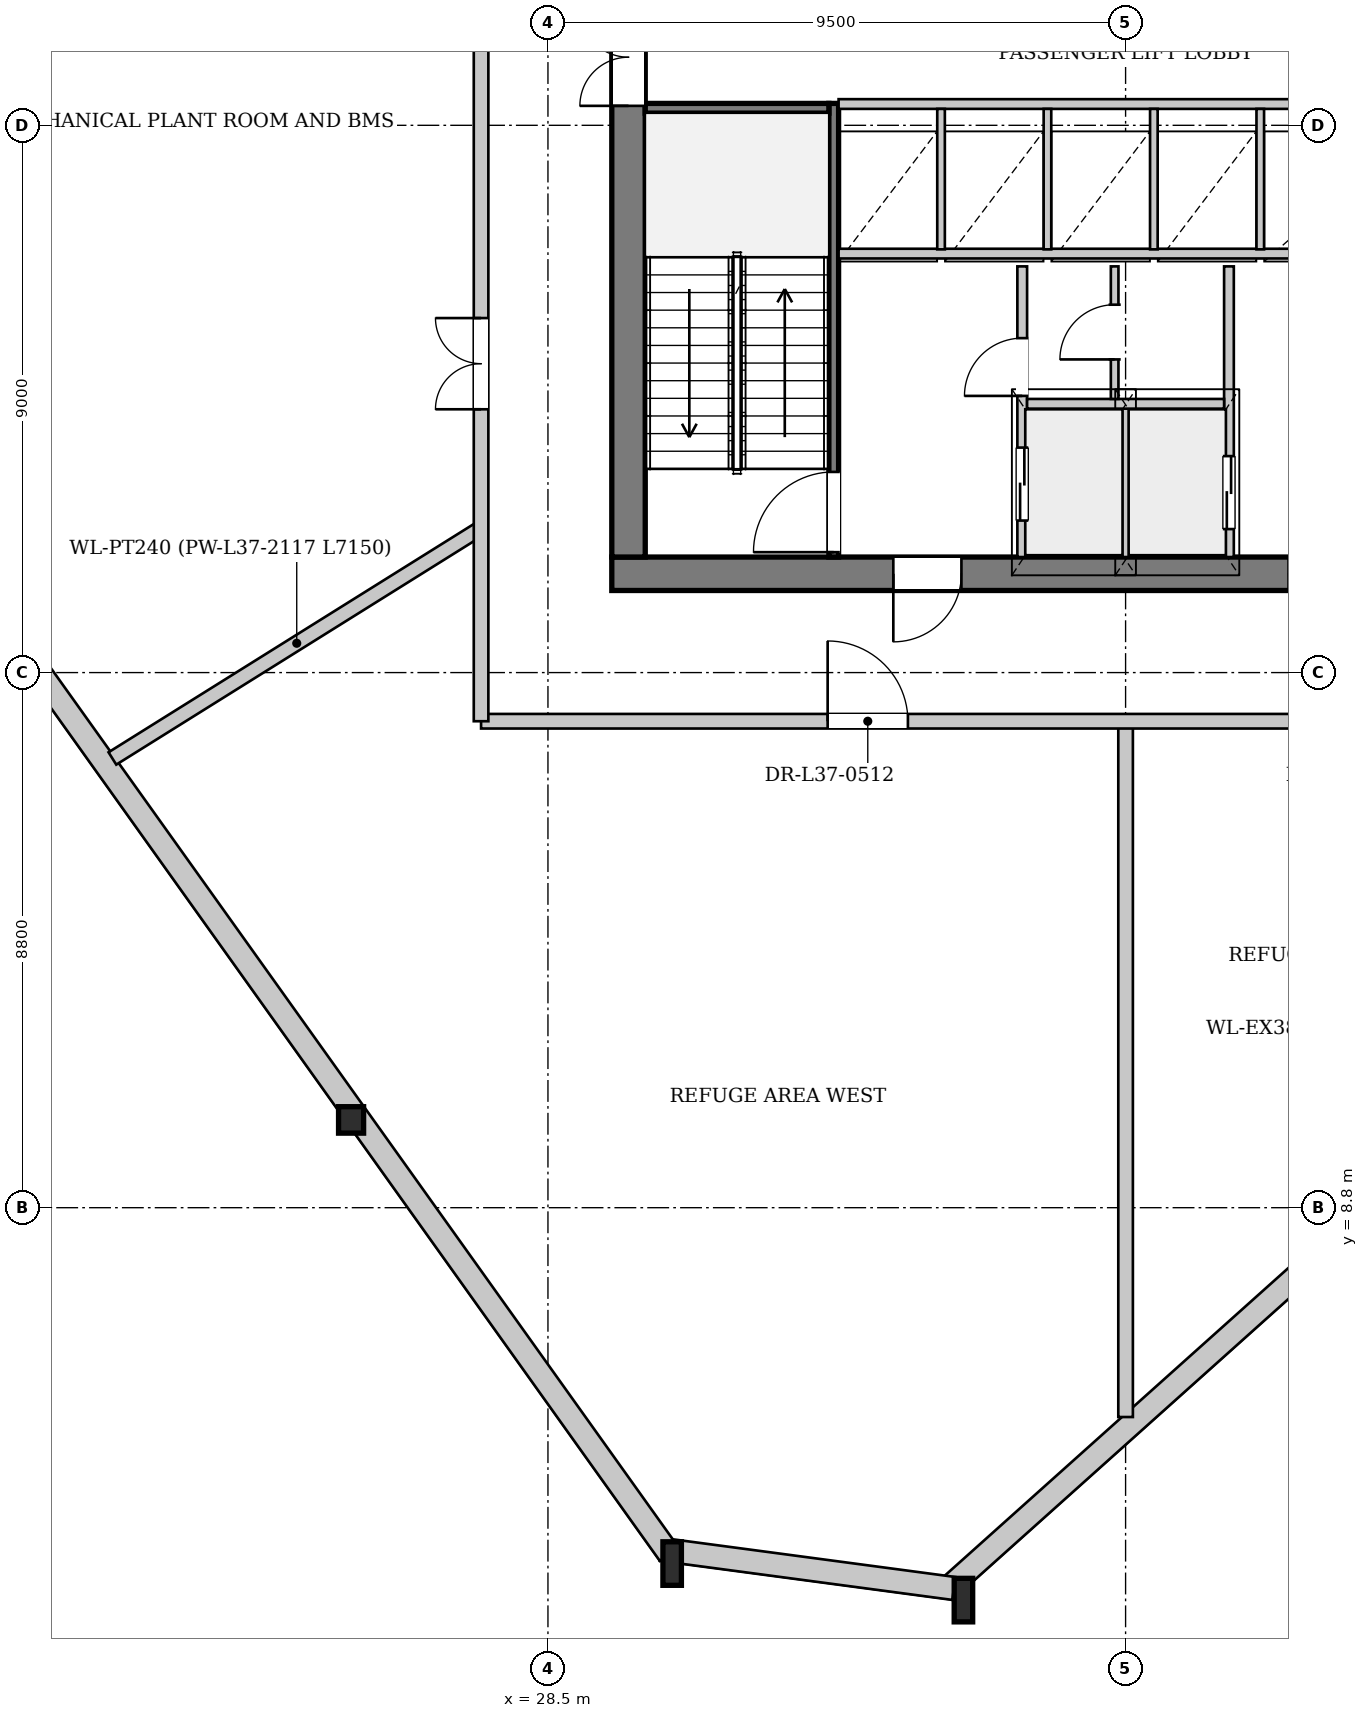
"""IFC4 building model, lengths in metres.
Left out: names, types, materials, properties, quantities, classifications, styles, units other than length and angle.
Written with IfcOpenShell. Run it as: python <this file> out.ifc"""

import sys

from ifc_helpers import new_model, si_unit, direction, frame, frame_2d, origin, origin_2d, place, context, subcontext, project, spatial, rectangle, i_section, extrude, source, transform, mapped, element, fill, save


model = new_model("IFC4")
c1 = context("Model", 3, precision=1e-05, world=origin(), true_north=direction((0.0, 1.0)))
c2 = subcontext(c1, "Body", "Model", "MODEL_VIEW")
j1 = project(units=[si_unit("LENGTHUNIT", "METRE"), si_unit("PLANEANGLEUNIT", "RADIAN")], contexts=[c1])
p1 = place(None, origin())
s1 = spatial("IfcSite", under=j1, at=p1, CompositionType="ELEMENT")
p2 = place(p1, origin())
s2 = spatial("IfcBuilding", under=s1, at=p2, CompositionType="ELEMENT")
p3 = place(p2, frame((0.0, 0.0, 142.1)))
s3 = spatial("IfcBuildingStorey", under=s2, at=p3, CompositionType="ELEMENT", Elevation=142.1)
m1 = source(origin(), c2, "Body", "SweptSolid", [
    extrude(i_section(OverallWidth=0.412, OverallDepth=0.435, WebThickness=0.031, FlangeThickness=0.05, at=origin_2d()), origin(), (0.0, 0.0, 1.0), 4.348),
])
p4 = place(p3, frame((19.868, 17.66, 0.0), z_axis=(0.052224238999, -0.055537389645, 0.997089879205), x_axis=(0.728502673194, 0.685042958616, 0.0)))
e1 = element("IfcColumn", 1, at=p4, inside=s3, PredefinedType="COLUMN", context=c2, shape_type="MappedRepresentation", body=[
    mapped(m1, transform((0.0, 0.0, 0.0), x_axis=(1.0, 0.0, 0.0), y_axis=(0.0, 1.0, 0.0), z_axis=(0.0, 0.0, 1.0), scale=1.0)),
])
m2 = source(origin(), c2, "Body", "SweptSolid", [
    extrude(i_section(OverallWidth=0.412, OverallDepth=0.435, WebThickness=0.031, FlangeThickness=0.05, at=origin_2d()), origin(), (0.0, 0.0, 1.0), 4.35),
])
p5 = place(p3, frame((25.104, 10.326, 0.0), z_axis=(0.072799172678, -0.037943130864, 0.996624602986), x_axis=(0.46219210593, 0.886779824543, 0.0)))
e2 = element("IfcColumn", 2, at=p5, inside=s3, PredefinedType="COLUMN", context=c2, shape_type="MappedRepresentation", body=[
    mapped(m2, transform((0.0, 0.0, 0.0), x_axis=(1.0, 0.0, 0.0), y_axis=(0.0, 1.0, 0.0), z_axis=(0.0, 0.0, 1.0), scale=1.0)),
])
m3 = source(origin(), c2, "Body", "SweptSolid", [
    extrude(i_section(OverallWidth=0.304, OverallDepth=0.716, WebThickness=0.021, FlangeThickness=0.04, at=origin_2d()), origin(), (0.0, 0.0, 1.0), 4.355),
])
p6 = place(p3, frame((30.34, 2.992, 0.0), z_axis=(0.093342536899, -0.02018217014, 0.995429480583), x_axis=(0.211332792528, 0.97741416544, 0.0)))
e3 = element("IfcColumn", 3, at=p6, inside=s3, PredefinedType="COLUMN", context=c2, shape_type="MappedRepresentation", body=[
    mapped(m3, transform((0.0, 0.0, 0.0), x_axis=(1.0, 0.0, 0.0), y_axis=(0.0, 1.0, 0.0), z_axis=(0.0, 0.0, 1.0), scale=1.0)),
])
m4 = source(origin(), c2, "Body", "SweptSolid", [
    extrude(i_section(OverallWidth=0.304, OverallDepth=0.716, WebThickness=0.021, FlangeThickness=0.04, at=origin_2d()), origin(), (0.0, 0.0, 1.0), 4.35),
])
p7 = place(p3, frame((35.151, 2.35, 0.0), z_axis=(0.083899938538, -0.001459129366, 0.996473116173), x_axis=(0.017388674879, 0.999848805563, 0.0)))
e4 = element("IfcColumn", 4, at=p7, inside=s3, PredefinedType="COLUMN", context=c2, shape_type="MappedRepresentation", body=[
    mapped(m4, transform((0.0, 0.0, 0.0), x_axis=(1.0, 0.0, 0.0), y_axis=(0.0, 1.0, 0.0), z_axis=(0.0, 0.0, 1.0), scale=1.0)),
])
p8 = place(p3, frame((52.652, 18.275, 0.0), z_axis=(0.0, 0.0, 1.0), x_axis=(-0.744998125176, -0.667066558511, 0.0)))
e5 = element("IfcWall", 5, at=p8, inside=s3, PredefinedType="SOLIDWALL", context=c2, shape_type="SweptSolid", body=[
    extrude(rectangle(XDim=23.662, YDim=0.38, at=frame_2d((11.831, 0.0))), origin(), (0.0, 0.0, 1.0), 3.642),
])
p9 = place(p3, frame((35.176, 2.538, 0.0), z_axis=(0.0, 0.0, 1.0), x_axis=(-0.991211199336, 0.132288919834, 0.0)))
e6 = element("IfcWall", 6, at=p9, inside=s3, PredefinedType="SOLIDWALL", context=c2, shape_type="SweptSolid", body=[
    extrude(rectangle(XDim=4.854, YDim=0.38, at=frame_2d((2.427, 0.0))), origin(), (0.0, 0.0, 1.0), 3.642),
])
p10 = place(p3, frame((30.494, 3.102, 0.0), z_axis=(0.0, 0.0, 1.0), x_axis=(-0.581022893879, 0.813887213801, 0.0)))
e7 = element("IfcWall", 7, at=p10, inside=s3, PredefinedType="SOLIDWALL", context=c2, shape_type="SweptSolid", body=[
    extrude(rectangle(XDim=18.022, YDim=0.38, at=frame_2d((9.011, 0.0))), origin(), (0.0, 0.0, 1.0), 3.642),
])
p11 = place(p3, frame((46.45, 19.225, 0.0), z_axis=(0.0, 0.0, 1.0), x_axis=(-1.0, 0.0, 0.0)))
e8 = element("IfcWall", 8, at=p11, inside=s3, PredefinedType="SHEAR", context=c2, shape_type="SweptSolid", body=[
    extrude(rectangle(XDim=16.9, YDim=0.55, at=frame_2d((8.45, 0.0))), origin(), (0.0, 0.0, 1.0), 4.25),
])
p12 = place(p11, frame((4.65, 0.0, 0.0)))
e9 = element("IfcOpeningElement", 9, at=p12, cuts=e8, PredefinedType="OPENING", context=c2, shape_type="SweptSolid", body=[
    extrude(rectangle(XDim=1.12, YDim=2.25, at=frame_2d((0.56, 1.125))), frame((0.0, 0.285, 0.0), z_axis=(0.0, -1.0, 0.0), x_axis=(1.0, 0.0, 0.0)), (0.0, 0.0, 1.0), 0.57),
])
p13 = place(p11, frame((11.15, 0.0, 0.0)))
e10 = element("IfcOpeningElement", 10, at=p13, cuts=e8, PredefinedType="OPENING", context=c2, shape_type="SweptSolid", body=[
    extrude(rectangle(XDim=1.12, YDim=2.25, at=frame_2d((0.56, 1.125))), frame((0.0, 0.285, 0.0), z_axis=(0.0, -1.0, 0.0), x_axis=(1.0, 0.0, 0.0)), (0.0, 0.0, 1.0), 0.57),
])
p14 = place(p3, frame((29.825, 19.5, 0.0), z_axis=(0.0, 0.0, 1.0), x_axis=(0.0, 1.0, 0.0)))
e11 = element("IfcWall", 11, at=p14, inside=s3, PredefinedType="SHEAR", context=c2, shape_type="SweptSolid", body=[
    extrude(rectangle(XDim=14.2, YDim=0.55, at=frame_2d((7.1, 0.0))), origin(), (0.0, 0.0, 1.0), 4.25),
])
p15 = place(p14, frame((7.42, 0.0, 0.0)))
e12 = element("IfcOpeningElement", 12, at=p15, cuts=e11, PredefinedType="OPENING", context=c2, shape_type="SweptSolid", body=[
    extrude(rectangle(XDim=1.6, YDim=2.2, at=frame_2d((0.8, 1.1))), frame((0.0, 0.285, 0.0), z_axis=(0.0, -1.0, 0.0), x_axis=(1.0, 0.0, 0.0)), (0.0, 0.0, 1.0), 0.57),
])
p16 = place(p3, frame((33.2, 19.5, 0.0), z_axis=(0.0, 0.0, 1.0), x_axis=(0.0, 1.0, 0.0)))
e13 = element("IfcWall", 13, at=p16, inside=s3, PredefinedType="PARTITIONING", context=c2, shape_type="SweptSolid", body=[
    extrude(rectangle(XDim=7.46, YDim=0.16, at=frame_2d((3.73, 0.0))), origin(), (0.0, 0.0, 1.0), 4.25),
])
p17 = place(p16, frame((0.08, 0.0, 0.0)))
e14 = element("IfcOpeningElement", 14, at=p17, cuts=e13, PredefinedType="OPENING", context=c2, shape_type="SweptSolid", body=[
    extrude(rectangle(XDim=1.32, YDim=2.2, at=frame_2d((0.66, 1.1))), frame((0.0, 0.09, 0.0), z_axis=(0.0, -1.0, 0.0), x_axis=(1.0, 0.0, 0.0)), (0.0, 0.0, 1.0), 0.18),
])
p18 = place(p3, frame((30.1, 26.88, 0.0), z_axis=(0.0, 0.0, 1.0), x_axis=(1.0, 0.0, 0.0)))
e15 = element("IfcWall", 15, at=p18, inside=s3, PredefinedType="PARTITIONING", context=c2, shape_type="SweptSolid", body=[
    extrude(rectangle(XDim=3.02, YDim=0.16, at=frame_2d((1.51, 0.0))), origin(), (0.0, 0.0, 1.0), 4.25),
])
p19 = place(p3, frame((36.3, 19.5, 0.0), z_axis=(0.0, 0.0, 1.0), x_axis=(0.0, 1.0, 0.0)))
e16 = element("IfcWall", 16, at=p19, inside=s3, PredefinedType="PARTITIONING", context=c2, shape_type="SweptSolid", body=[
    extrude(rectangle(XDim=4.78, YDim=0.16, at=frame_2d((2.39, 0.0))), origin(), (0.0, 0.0, 1.0), 4.25),
])
p20 = place(p19, frame((0.6, 0.0, 0.0)))
e17 = element("IfcOpeningElement", 17, at=p20, cuts=e16, PredefinedType="OPENING", context=c2, shape_type="SweptSolid", body=[
    extrude(rectangle(XDim=1.2, YDim=2.2, at=frame_2d((0.6, 1.1))), frame((0.0, 0.09, 0.0), z_axis=(0.0, -1.0, 0.0), x_axis=(1.0, 0.0, 0.0)), (0.0, 0.0, 1.0), 0.18),
])
p21 = place(p19, frame((2.65, 0.0, 0.0)))
e18 = element("IfcOpeningElement", 18, at=p21, cuts=e16, PredefinedType="OPENING", context=c2, shape_type="SweptSolid", body=[
    extrude(rectangle(XDim=0.95, YDim=2.1, at=frame_2d((0.475, 1.05))), frame((0.0, 0.09, 0.0), z_axis=(0.0, -1.0, 0.0), x_axis=(1.0, 0.0, 0.0)), (0.0, 0.0, 1.0), 0.18),
])
p22 = place(p3, frame((39.7, 24.28, 0.0), z_axis=(0.0, 0.0, 1.0), x_axis=(0.0, -1.0, 0.0)))
e19 = element("IfcWall", 19, at=p22, inside=s3, PredefinedType="PARTITIONING", context=c2, shape_type="SweptSolid", body=[
    extrude(rectangle(XDim=4.78, YDim=0.16, at=frame_2d((2.39, 0.0))), origin(), (0.0, 0.0, 1.0), 4.25),
])
p23 = place(p22, frame((3.12, 0.0, 0.0)))
e20 = element("IfcOpeningElement", 20, at=p23, cuts=e19, PredefinedType="OPENING", context=c2, shape_type="SweptSolid", body=[
    extrude(rectangle(XDim=1.2, YDim=2.2, at=frame_2d((0.6, 1.1))), frame((0.0, 0.09, 0.0), z_axis=(0.0, -1.0, 0.0), x_axis=(1.0, 0.0, 0.0)), (0.0, 0.0, 1.0), 0.18),
])
p24 = place(p3, frame((38.0, 19.5, 0.0), z_axis=(0.0, 0.0, 1.0), x_axis=(0.0, 1.0, 0.0)))
e21 = element("IfcWall", 21, at=p24, inside=s3, PredefinedType="PARTITIONING", context=c2, shape_type="SweptSolid", body=[
    extrude(rectangle(XDim=2.46, YDim=0.125, at=frame_2d((1.23, 0.0))), origin(), (0.0, 0.0, 1.0), 4.25),
])
p25 = place(p3, frame((36.38, 22.02, 0.0), z_axis=(0.0, 0.0, 1.0), x_axis=(1.0, 0.0, 0.0)))
e22 = element("IfcWall", 22, at=p25, inside=s3, PredefinedType="PARTITIONING", context=c2, shape_type="SweptSolid", body=[
    extrude(rectangle(XDim=3.24, YDim=0.16, at=frame_2d((1.62, 0.0))), origin(), (0.0, 0.0, 1.0), 4.25),
])
p26 = place(p3, frame((33.28, 24.49, 0.0), z_axis=(0.0, 0.0, 1.0), x_axis=(1.0, 0.0, 0.0)))
e23 = element("IfcWall", 23, at=p26, inside=s3, PredefinedType="PARTITIONING", context=c2, shape_type="SweptSolid", body=[
    extrude(rectangle(XDim=9.44, YDim=0.16, at=frame_2d((4.72, 0.0))), origin(), (0.0, 0.0, 1.0), 4.25),
])
p27 = place(p3, frame((37.82, 22.1, 0.0), z_axis=(0.0, 0.0, 1.0), x_axis=(0.0, 1.0, 0.0)))
e24 = element("IfcWall", 24, at=p27, inside=s3, PredefinedType="PARTITIONING", context=c2, shape_type="SweptSolid", body=[
    extrude(rectangle(XDim=2.18, YDim=0.125, at=frame_2d((1.09, 0.0))), origin(), (0.0, 0.0, 1.0), 4.25),
])
p28 = place(p27, frame((0.65, 0.0, 0.0)))
e25 = element("IfcOpeningElement", 25, at=p28, cuts=e24, PredefinedType="OPENING", context=c2, shape_type="SweptSolid", body=[
    extrude(rectangle(XDim=0.9, YDim=2.1, at=frame_2d((0.45, 1.05))), frame((0.0, 0.073, 0.0), z_axis=(0.0, -1.0, 0.0), x_axis=(1.0, 0.0, 0.0)), (0.0, 0.0, 1.0), 0.145),
])
p29 = place(p3, frame((33.28, 26.95, 0.0), z_axis=(0.0, 0.0, 1.0), x_axis=(1.0, 0.0, 0.0)))
e26 = element("IfcWall", 26, at=p29, inside=s3, PredefinedType="PARTITIONING", context=c2, shape_type="SweptSolid", body=[
    extrude(rectangle(XDim=9.44, YDim=0.16, at=frame_2d((4.72, 0.0))), origin(), (0.0, 0.0, 1.0), 4.25),
])
for number, where, z_axis, x_axis in (
    (27, (34.965, 24.56, 0.0), (0.0, 0.0, 1.0), (0.0, 1.0, 0.0)),
    (28, (36.715, 24.56, 0.0), (0.0, 0.0, 1.0), (0.0, 1.0, 0.0)),
    (29, (38.465, 24.56, 0.0), (0.0, 0.0, 1.0), (0.0, 1.0, 0.0)),
    (30, (40.215, 24.56, 0.0), (0.0, 0.0, 1.0), (0.0, 1.0, 0.0)),
):
    element("IfcWall", number, at=place(p3, frame(where, z_axis=z_axis, x_axis=x_axis)), inside=s3, PredefinedType="PARTITIONING", context=c2, shape_type="SweptSolid", body=[
        extrude(rectangle(XDim=2.31, YDim=0.125, at=frame_2d((1.155, 0.0))), origin(), (0.0, 0.0, 1.0), 4.25),
    ])
p30 = place(p3, frame((27.4, 19.976, 0.0), z_axis=(0.0, 0.0, 1.0), x_axis=(-0.848048180336, -0.529919129518, 0.0)))
e31 = element("IfcWall", 31, at=p30, inside=s3, PredefinedType="PARTITIONING", context=c2, shape_type="SweptSolid", body=[
    extrude(rectangle(XDim=7.149, YDim=0.24, at=frame_2d((3.575, 0.0))), origin(), (0.0, 0.0, 1.0), 4.25),
])
p31 = place(p3, frame((38.0, 16.8, 0.0), z_axis=(0.0, 0.0, 1.0), x_axis=(0.0, -1.0, 0.0)))
e32 = element("IfcWall", 32, at=p31, inside=s3, PredefinedType="PARTITIONING", context=c2, shape_type="SweptSolid", body=[
    extrude(rectangle(XDim=11.443, YDim=0.24, at=frame_2d((5.721, 0.0))), origin(), (0.0, 0.0, 1.0), 4.25),
])
p32 = place(p3, frame((27.4, 16.8, 0.0), z_axis=(0.0, 0.0, 1.0), x_axis=(1.0, 0.0, 0.0)))
e33 = element("IfcWall", 33, at=p32, inside=s3, PredefinedType="PARTITIONING", context=c2, shape_type="SweptSolid", body=[
    extrude(rectangle(XDim=21.2, YDim=0.24, at=frame_2d((10.6, 0.0))), origin(), (0.0, 0.0, 1.0), 4.25),
])
p33 = place(p32, frame((5.7, 0.0, 0.0)))
e34 = element("IfcOpeningElement", 34, at=p33, cuts=e33, PredefinedType="OPENING", context=c2, shape_type="SweptSolid", body=[
    extrude(rectangle(XDim=1.32, YDim=2.2, at=frame_2d((0.66, 1.1))), frame((0.0, 0.13, 0.0), z_axis=(0.0, -1.0, 0.0), x_axis=(1.0, 0.0, 0.0)), (0.0, 0.0, 1.0), 0.26),
])
p34 = place(p32, frame((14.18, 0.0, 0.0)))
e35 = element("IfcOpeningElement", 35, at=p34, cuts=e33, PredefinedType="OPENING", context=c2, shape_type="SweptSolid", body=[
    extrude(rectangle(XDim=1.5, YDim=2.25, at=frame_2d((0.75, 1.125))), frame((0.0, 0.13, 0.0), z_axis=(0.0, -1.0, 0.0), x_axis=(1.0, 0.0, 0.0)), (0.0, 0.0, 1.0), 0.26),
])
p35 = place(p3, frame((27.4, 16.8, 0.0), z_axis=(0.0, 0.0, 1.0), x_axis=(0.0, 1.0, 0.0)))
e36 = element("IfcWall", 36, at=p35, inside=s3, PredefinedType="PARTITIONING", context=c2, shape_type="SweptSolid", body=[
    extrude(rectangle(XDim=19.6, YDim=0.24, at=frame_2d((9.8, 0.0))), origin(), (0.0, 0.0, 1.0), 4.25),
])
p36 = place(p35, frame((5.13, 0.0, 0.0)))
e37 = element("IfcOpeningElement", 37, at=p36, cuts=e36, PredefinedType="OPENING", context=c2, shape_type="SweptSolid", body=[
    extrude(rectangle(XDim=1.5, YDim=2.25, at=frame_2d((0.75, 1.125))), frame((0.0, 0.13, 0.0), z_axis=(0.0, -1.0, 0.0), x_axis=(1.0, 0.0, 0.0)), (0.0, 0.0, 1.0), 0.26),
])
p37 = place(p35, frame((14.57, 0.0, 0.0)))
e38 = element("IfcOpeningElement", 38, at=p37, cuts=e36, PredefinedType="OPENING", context=c2, shape_type="SweptSolid", body=[
    extrude(rectangle(XDim=1.5, YDim=2.25, at=frame_2d((0.75, 1.125))), frame((0.0, 0.13, 0.0), z_axis=(0.0, -1.0, 0.0), x_axis=(1.0, 0.0, 0.0)), (0.0, 0.0, 1.0), 0.26),
])
m5 = source(origin(), c2, "Body", "SweptSolid", [
    extrude(rectangle(XDim=1.12, YDim=2.25, at=frame_2d((0.56, 1.125))), frame((0.0, 0.025, 0.0), z_axis=(0.0, -1.0, 0.0), x_axis=(1.0, 0.0, 0.0)), (0.0, 0.0, 1.0), 0.05),
])
p38 = place(p13, origin())
e39 = element("IfcDoor", 39, at=p38, inside=s3, OperationType="SINGLE_SWING_RIGHT", PredefinedType="DOOR", context=c2, shape_type="MappedRepresentation", body=[
    mapped(m5, transform((0.0, 0.0, 0.0), x_axis=(1.0, 0.0, 0.0), y_axis=(0.0, 1.0, 0.0), z_axis=(0.0, 0.0, 1.0), scale=1.0)),
])
fill(e10, e39)
m6 = source(origin(), c2, "Body", "SweptSolid", [
    extrude(rectangle(XDim=1.6, YDim=2.2, at=frame_2d((0.8, 1.1))), frame((0.0, 0.025, 0.0), z_axis=(0.0, -1.0, 0.0), x_axis=(1.0, 0.0, 0.0)), (0.0, 0.0, 1.0), 0.05),
])
p39 = place(p15, origin())
e40 = element("IfcDoor", 40, at=p39, inside=s3, OperationType="DOUBLE_DOOR_SINGLE_SWING", PredefinedType="DOOR", context=c2, shape_type="MappedRepresentation", body=[
    mapped(m6, transform((0.0, 0.0, 0.0), x_axis=(1.0, 0.0, 0.0), y_axis=(0.0, 1.0, 0.0), z_axis=(0.0, 0.0, 1.0), scale=1.0)),
])
fill(e12, e40)
m7 = source(origin(), c2, "Body", "SweptSolid", [
    extrude(rectangle(XDim=1.32, YDim=2.2, at=frame_2d((0.66, 1.1))), frame((0.0, 0.025, 0.0), z_axis=(0.0, -1.0, 0.0), x_axis=(1.0, 0.0, 0.0)), (0.0, 0.0, 1.0), 0.05),
])
p40 = place(p17, origin())
e41 = element("IfcDoor", 41, at=p40, inside=s3, OperationType="SINGLE_SWING_LEFT", PredefinedType="DOOR", context=c2, shape_type="MappedRepresentation", body=[
    mapped(m7, transform((0.0, 0.0, 0.0), x_axis=(1.0, 0.0, 0.0), y_axis=(0.0, 1.0, 0.0), z_axis=(0.0, 0.0, 1.0), scale=1.0)),
])
fill(e14, e41)
m8 = source(origin(), c2, "Body", "SweptSolid", [
    extrude(rectangle(XDim=1.2, YDim=2.2, at=frame_2d((0.6, 1.1))), frame((0.0, 0.025, 0.0), z_axis=(0.0, -1.0, 0.0), x_axis=(1.0, 0.0, 0.0)), (0.0, 0.0, 1.0), 0.05),
])
p41 = place(p20, origin())
e42 = element("IfcDoor", 42, at=p41, inside=s3, OperationType="DOUBLE_DOOR_SLIDING", PredefinedType="DOOR", context=c2, shape_type="MappedRepresentation", body=[
    mapped(m8, transform((0.0, 0.0, 0.0), x_axis=(1.0, 0.0, 0.0), y_axis=(0.0, 1.0, 0.0), z_axis=(0.0, 0.0, 1.0), scale=1.0)),
])
fill(e17, e42)
m9 = source(origin(), c2, "Body", "SweptSolid", [
    extrude(rectangle(XDim=0.95, YDim=2.1, at=frame_2d((0.475, 1.05))), frame((0.0, 0.025, 0.0), z_axis=(0.0, -1.0, 0.0), x_axis=(1.0, 0.0, 0.0)), (0.0, 0.0, 1.0), 0.05),
])
p42 = place(p21, origin())
e43 = element("IfcDoor", 43, at=p42, inside=s3, OperationType="SINGLE_SWING_LEFT", PredefinedType="DOOR", context=c2, shape_type="MappedRepresentation", body=[
    mapped(m9, transform((0.0, 0.0, 0.0), x_axis=(1.0, 0.0, 0.0), y_axis=(0.0, 1.0, 0.0), z_axis=(0.0, 0.0, 1.0), scale=1.0)),
])
fill(e18, e43)
m10 = source(origin(), c2, "Body", "SweptSolid", [
    extrude(rectangle(XDim=0.9, YDim=2.1, at=frame_2d((0.45, 1.05))), frame((0.0, 0.025, 0.0), z_axis=(0.0, -1.0, 0.0), x_axis=(1.0, 0.0, 0.0)), (0.0, 0.0, 1.0), 0.05),
])
p43 = place(p28, origin())
e44 = element("IfcDoor", 44, at=p43, inside=s3, OperationType="SINGLE_SWING_LEFT", PredefinedType="DOOR", context=c2, shape_type="MappedRepresentation", body=[
    mapped(m10, transform((0.0, 0.0, 0.0), x_axis=(1.0, 0.0, 0.0), y_axis=(0.0, 1.0, 0.0), z_axis=(0.0, 0.0, 1.0), scale=1.0)),
])
fill(e25, e44)
p44 = place(p23, origin())
e45 = element("IfcDoor", 45, at=p44, inside=s3, OperationType="DOUBLE_DOOR_SLIDING", PredefinedType="DOOR", context=c2, shape_type="MappedRepresentation", body=[
    mapped(m8, transform((0.0, 0.0, 0.0), x_axis=(1.0, 0.0, 0.0), y_axis=(0.0, 1.0, 0.0), z_axis=(0.0, 0.0, 1.0), scale=1.0)),
])
fill(e20, e45)
p45 = place(p33, origin())
e46 = element("IfcDoor", 46, at=p45, inside=s3, OperationType="SINGLE_SWING_LEFT", PredefinedType="DOOR", context=c2, shape_type="MappedRepresentation", body=[
    mapped(m7, transform((0.0, 0.0, 0.0), x_axis=(1.0, 0.0, 0.0), y_axis=(0.0, 1.0, 0.0), z_axis=(0.0, 0.0, 1.0), scale=1.0)),
])
fill(e34, e46)
m11 = source(origin(), c2, "Body", "SweptSolid", [
    extrude(rectangle(XDim=1.5, YDim=2.25, at=frame_2d((0.75, 1.125))), frame((0.0, 0.025, 0.0), z_axis=(0.0, -1.0, 0.0), x_axis=(1.0, 0.0, 0.0)), (0.0, 0.0, 1.0), 0.05),
])
p46 = place(p36, origin())
e47 = element("IfcDoor", 47, at=p46, inside=s3, OperationType="DOUBLE_DOOR_SINGLE_SWING", PredefinedType="DOOR", context=c2, shape_type="MappedRepresentation", body=[
    mapped(m11, transform((0.0, 0.0, 0.0), x_axis=(1.0, 0.0, 0.0), y_axis=(0.0, 1.0, 0.0), z_axis=(0.0, 0.0, 1.0), scale=1.0)),
])
fill(e37, e47)
save(model, sys.argv[1])
